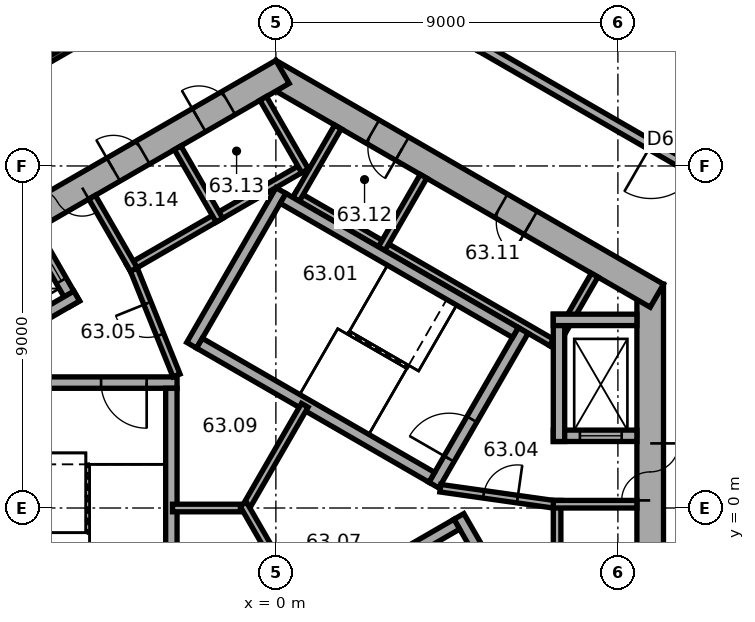
"""IFC4 building model, lengths in metres.
Left out: names, types, materials, properties, quantities, classifications, styles, units other than length and angle.
Written with IfcOpenShell. Run it as: python <this file> out.ifc"""

import sys

from ifc_helpers import new_model, si_unit, direction, frame, frame_2d, origin, place, context, subcontext, project, spatial, rectangle, extrude, element, fill, save


model = new_model("IFC4")
c1 = context("Model", 3, precision=1e-05, world=origin(), true_north=direction((0.0, 1.0)))
c2 = subcontext(c1, "Body", "Model", "MODEL_VIEW")
j1 = project(units=[si_unit("LENGTHUNIT", "METRE"), si_unit("PLANEANGLEUNIT", "RADIAN")], contexts=[c1])
p1 = place(None, origin())
s1 = spatial("IfcSite", under=j1, at=p1, CompositionType="ELEMENT")
p2 = place(p1, origin())
s2 = spatial("IfcBuilding", under=s1, at=p2, CompositionType="ELEMENT")
p3 = place(p2, frame((0.0, 0.0, 255.0)))
s3 = spatial("IfcBuildingStorey", under=s2, at=p3, CompositionType="ELEMENT", Elevation=255.0)
p4 = place(p3, frame((9.85, -5.889, 0.0), z_axis=(0.0, 0.0, 1.0), x_axis=(0.0, 1.0, 0.0)))
e1 = element("IfcWall", 1, at=p4, inside=s3, PredefinedType="SHEAR", context=c2, shape_type="SweptSolid", body=[
    extrude(rectangle(XDim=11.778, YDim=0.7, at=frame_2d((5.889, 0.0))), origin(), (0.0, 0.0, 1.0), 4.8),
])
p5 = place(p4, frame((6.089, 0.0, 0.0)))
e2 = element("IfcOpeningElement", 2, at=p5, cuts=e1, PredefinedType="OPENING", context=c2, shape_type="SweptSolid", body=[
    extrude(rectangle(XDim=1.5, YDim=2.1, at=frame_2d((0.75, 1.05))), frame((0.0, 0.36, 0.0), z_axis=(0.0, -1.0, 0.0), x_axis=(1.0, 0.0, 0.0)), (0.0, 0.0, 1.0), 0.72),
])
p6 = place(p4, frame((2.939, 0.0, 0.0)))
e3 = element("IfcOpeningElement", 3, at=p6, cuts=e1, PredefinedType="OPENING", context=c2, shape_type="SweptSolid", body=[
    extrude(rectangle(XDim=0.9, YDim=2.1, at=frame_2d((0.45, 1.05))), frame((0.0, 0.36, 0.0), z_axis=(0.0, -1.0, 0.0), x_axis=(1.0, 0.0, 0.0)), (0.0, 0.0, 1.0), 0.72),
])
p7 = place(p3, frame((10.025, 5.586, 0.0), z_axis=(0.0, 0.0, 1.0), x_axis=(-0.866026453023, 0.499998182661, 0.0)))
e4 = element("IfcWall", 4, at=p7, inside=s3, PredefinedType="SHEAR", context=c2, shape_type="SweptSolid", body=[
    extrude(rectangle(XDim=11.778, YDim=0.7, at=frame_2d((5.889, 0.0))), origin(), (0.0, 0.0, 1.0), 4.8),
])
p8 = place(p7, frame((3.839, 0.0, 0.0)))
e5 = element("IfcOpeningElement", 5, at=p8, cuts=e4, PredefinedType="OPENING", context=c2, shape_type="SweptSolid", body=[
    extrude(rectangle(XDim=0.9, YDim=2.1, at=frame_2d((0.45, 1.05))), frame((0.0, 0.36, 0.0), z_axis=(0.0, -1.0, 0.0), x_axis=(1.0, 0.0, 0.0)), (0.0, 0.0, 1.0), 0.72),
])
p9 = place(p7, frame((7.739, 0.0, 0.0)))
e6 = element("IfcOpeningElement", 6, at=p9, cuts=e4, PredefinedType="OPENING", context=c2, shape_type="SweptSolid", body=[
    extrude(rectangle(XDim=0.9, YDim=2.1, at=frame_2d((0.45, 1.05))), frame((0.0, 0.36, 0.0), z_axis=(0.0, -1.0, 0.0), x_axis=(1.0, 0.0, 0.0)), (0.0, 0.0, 1.0), 0.72),
])
p10 = place(p3, frame((0.175, 11.475, 0.0), z_axis=(0.0, 0.0, 1.0), x_axis=(-0.866026453023, -0.499998182661, 0.0)))
e7 = element("IfcWall", 7, at=p10, inside=s3, PredefinedType="SHEAR", context=c2, shape_type="SweptSolid", body=[
    extrude(rectangle(XDim=11.778, YDim=0.7, at=frame_2d((5.889, 0.0))), origin(), (0.0, 0.0, 1.0), 4.8),
])
p11 = place(p10, frame((6.089, 0.0, 0.0)))
e8 = element("IfcOpeningElement", 8, at=p11, cuts=e7, PredefinedType="OPENING", context=c2, shape_type="SweptSolid", body=[
    extrude(rectangle(XDim=1.5, YDim=2.1, at=frame_2d((0.75, 1.05))), frame((0.0, 0.36, 0.0), z_axis=(0.0, -1.0, 0.0), x_axis=(1.0, 0.0, 0.0)), (0.0, 0.0, 1.0), 0.72),
])
p12 = place(p10, frame((1.639, 0.0, 0.0)))
e9 = element("IfcOpeningElement", 9, at=p12, cuts=e7, PredefinedType="OPENING", context=c2, shape_type="SweptSolid", body=[
    extrude(rectangle(XDim=0.9, YDim=2.1, at=frame_2d((0.45, 1.05))), frame((0.0, 0.36, 0.0), z_axis=(0.0, -1.0, 0.0), x_axis=(1.0, 0.0, 0.0)), (0.0, 0.0, 1.0), 0.72),
])
p13 = place(p10, frame((4.239, 0.0, 0.0)))
e10 = element("IfcOpeningElement", 10, at=p13, cuts=e7, PredefinedType="OPENING", context=c2, shape_type="SweptSolid", body=[
    extrude(rectangle(XDim=0.9, YDim=2.1, at=frame_2d((0.45, 1.05))), frame((0.0, 0.36, 0.0), z_axis=(0.0, -1.0, 0.0), x_axis=(1.0, 0.0, 0.0)), (0.0, 0.0, 1.0), 0.72),
])
p14 = place(p3, frame((7.4, -5.2, 0.0), z_axis=(0.0, 0.0, 1.0), x_axis=(0.0, 1.0, 0.0)))
e11 = element("IfcWall", 11, at=p14, inside=s3, PredefinedType="PARTITIONING", context=c2, shape_type="SweptSolid", body=[
    extrude(rectangle(XDim=5.4, YDim=0.2, at=frame_2d((2.7, 0.0))), origin(), (0.0, 0.0, 1.0), 4.52),
])
p15 = place(p3, frame((7.3, 0.1, 0.0), z_axis=(0.0, 0.0, 1.0), x_axis=(1.0, 0.0, 0.0)))
e12 = element("IfcWall", 12, at=p15, inside=s3, PredefinedType="PARTITIONING", context=c2, shape_type="SweptSolid", body=[
    extrude(rectangle(XDim=2.2, YDim=0.2, at=frame_2d((1.1, 0.0))), origin(), (0.0, 0.0, 1.0), 4.52),
])
p16 = place(p3, frame((7.424, 4.259, 0.0), z_axis=(0.0, 0.0, 1.0), x_axis=(-0.866026010844, 0.49999894854, 0.0)))
e13 = element("IfcWall", 13, at=p16, inside=s3, PredefinedType="PARTITIONING", context=c2, shape_type="SweptSolid", body=[
    extrude(rectangle(XDim=8.0, YDim=0.2, at=frame_2d((4.0, 0.0))), origin(), (0.0, 0.0, 1.0), 4.52),
])
for number, where, z_axis, x_axis in (
    (14, (7.287, 4.222, 0.0), (0.0, 0.0, 1.0), (0.5, 0.866, 0.0)),
    (15, (2.784, 6.822, 0.0), (0.0, 0.0, 1.0), (0.5, 0.866, 0.0)),
    (16, (0.532, 8.122, 0.0), (0.0, 0.0, 1.0), (0.5, 0.866, 0.0)),
):
    element("IfcWall", number, at=place(p3, frame(where, z_axis=z_axis, x_axis=x_axis)), inside=s3, PredefinedType="PARTITIONING", context=c2, shape_type="SweptSolid", body=[
        extrude(rectangle(XDim=2.2, YDim=0.2, at=frame_2d((1.1, 0.0))), origin(), (0.0, 0.0, 1.0), 4.52),
    ])
p17 = place(p3, frame((0.803, 9.009, 0.0), z_axis=(0.0, 0.0, 1.0), x_axis=(-0.866028230842, -0.499995103361, 0.0)))
e17 = element("IfcWall", 17, at=p17, inside=s3, PredefinedType="PARTITIONING", context=c2, shape_type="SweptSolid", body=[
    extrude(rectangle(XDim=5.4, YDim=0.2, at=frame_2d((2.7, 0.0))), origin(), (0.0, 0.0, 1.0), 4.52),
])
p18 = place(p3, frame((0.767, 8.872, 0.0), z_axis=(0.0, 0.0, 1.0), x_axis=(-0.499994660107, 0.866028486751, 0.0)))
e18 = element("IfcWall", 18, at=p18, inside=s3, PredefinedType="PARTITIONING", context=c2, shape_type="SweptSolid", body=[
    extrude(rectangle(XDim=2.2, YDim=0.2, at=frame_2d((1.1, 0.0))), origin(), (0.0, 0.0, 1.0), 4.52),
])
for number, where, z_axis, x_axis in (
    (19, (-1.485, 7.572, 0.0), (0.0, 0.0, 1.0), (-0.5, 0.866, 0.0)),
    (20, (-3.737, 6.272, 0.0), (0.0, 0.0, 1.0), (-0.5, 0.866, 0.0)),
):
    element("IfcWall", number, at=place(p3, frame(where, z_axis=z_axis, x_axis=x_axis)), inside=s3, PredefinedType="PARTITIONING", context=c2, shape_type="SweptSolid", body=[
        extrude(rectangle(XDim=2.2, YDim=0.2, at=frame_2d((1.1, 0.0))), origin(), (0.0, 0.0, 1.0), 4.52),
    ])
p19 = place(p3, frame((4.158, 0.602, 0.0), z_axis=(0.0, 0.0, 1.0), x_axis=(0.499977259774, 0.866038532462, 0.0)))
e21 = element("IfcWall", 21, at=p19, inside=s3, PredefinedType="SHEAR", context=c2, shape_type="SweptSolid", body=[
    extrude(rectangle(XDim=4.7, YDim=0.3, at=frame_2d((2.35, 0.0))), origin(), (0.0, 0.0, 1.0), 4.52),
])
p20 = place(p19, frame((0.8, 0.0, 0.0)))
e22 = element("IfcOpeningElement", 22, at=p20, cuts=e21, PredefinedType="OPENING", context=c2, shape_type="SweptSolid", body=[
    extrude(rectangle(XDim=1.2, YDim=2.1, at=frame_2d((0.6, 1.05))), frame((0.0, 0.16, 0.0), z_axis=(0.0, -1.0, 0.0), x_axis=(1.0, 0.0, 0.0)), (0.0, 0.0, 1.0), 0.32),
])
p21 = place(p3, frame((-2.216, 4.282, 0.0), z_axis=(0.0, 0.0, 1.0), x_axis=(0.499977259774, 0.866038532462, 0.0)))
e23 = element("IfcWall", 23, at=p21, inside=s3, PredefinedType="SHEAR", context=c2, shape_type="SweptSolid", body=[
    extrude(rectangle(XDim=4.7, YDim=0.3, at=frame_2d((2.35, 0.0))), origin(), (0.0, 0.0, 1.0), 4.52),
])
for number, where, z_axis, x_axis in (
    (24, (4.103, 0.807, 0.0), (0.0, 0.0, 1.0), (-0.866, 0.5, 0.0)),
    (25, (6.303, 4.617, 0.0), (0.0, 0.0, 1.0), (-0.866, 0.5, 0.0)),
):
    element("IfcWall", number, at=place(p3, frame(where, z_axis=z_axis, x_axis=x_axis)), inside=s3, PredefinedType="SHEAR", context=c2, shape_type="SweptSolid", body=[
        extrude(rectangle(XDim=7.06, YDim=0.3, at=frame_2d((3.53, 0.0))), origin(), (0.0, 0.0, 1.0), 4.52),
    ])
p22 = place(p3, frame((-2.6, 3.3, 0.0), z_axis=(0.0, 0.0, 1.0), x_axis=(-1.0, 0.0, 0.0)))
e26 = element("IfcWall", 26, at=p22, inside=s3, PredefinedType="SHEAR", context=c2, shape_type="SweptSolid", body=[
    extrude(rectangle(XDim=4.7, YDim=0.3, at=frame_2d((2.35, 0.0))), origin(), (0.0, 0.0, 1.0), 4.52),
])
p23 = place(p22, frame((0.8, 0.0, 0.0)))
e27 = element("IfcOpeningElement", 27, at=p23, cuts=e26, PredefinedType="OPENING", context=c2, shape_type="SweptSolid", body=[
    extrude(rectangle(XDim=1.2, YDim=2.1, at=frame_2d((0.6, 1.05))), frame((0.0, 0.16, 0.0), z_axis=(0.0, -1.0, 0.0), x_axis=(1.0, 0.0, 0.0)), (0.0, 0.0, 1.0), 0.32),
])
p24 = place(p3, frame((-2.75, 3.15, 0.0), z_axis=(0.0, 0.0, 1.0), x_axis=(0.0, -1.0, 0.0)))
e28 = element("IfcWall", 28, at=p24, inside=s3, PredefinedType="SHEAR", context=c2, shape_type="SweptSolid", body=[
    extrude(rectangle(XDim=7.06, YDim=0.3, at=frame_2d((3.53, 0.0))), origin(), (0.0, 0.0, 1.0), 4.52),
])
p25 = place(p3, frame((4.816, -0.222, 0.0), z_axis=(0.0, 0.0, 1.0), x_axis=(0.499977259774, -0.866038532462, 0.0)))
e29 = element("IfcWall", 29, at=p25, inside=s3, PredefinedType="SHEAR", context=c2, shape_type="SweptSolid", body=[
    extrude(rectangle(XDim=4.7, YDim=0.3, at=frame_2d((2.35, 0.0))), origin(), (0.0, 0.0, 1.0), 4.52),
])
p26 = place(p3, frame((-1.353, -3.957, 0.0), z_axis=(0.0, 0.0, 1.0), x_axis=(0.866027801685, 0.499995846692, 0.0)))
e30 = element("IfcWall", 30, at=p26, inside=s3, PredefinedType="SHEAR", context=c2, shape_type="SweptSolid", body=[
    extrude(rectangle(XDim=7.06, YDim=0.3, at=frame_2d((3.53, 0.0))), origin(), (0.0, 0.0, 1.0), 4.52),
])
p27 = place(p3, frame((7.3, 1.9, 0.0), z_axis=(0.0, 0.0, 1.0), x_axis=(1.0, 0.0, 0.0)))
e31 = element("IfcWall", 31, at=p27, inside=s3, PredefinedType="SHEAR", context=c2, shape_type="SweptSolid", body=[
    extrude(rectangle(XDim=2.2, YDim=0.3, at=frame_2d((1.1, 0.0))), origin(), (0.0, 0.0, 1.0), 4.52),
])
p28 = place(p27, frame((0.7, 0.0, 0.0)))
e32 = element("IfcOpeningElement", 32, at=p28, cuts=e31, PredefinedType="OPENING", context=c2, shape_type="SweptSolid", body=[
    extrude(rectangle(XDim=1.1, YDim=2.1, at=frame_2d((0.55, 1.05))), frame((0.0, 0.16, 0.0), z_axis=(0.0, -1.0, 0.0), x_axis=(1.0, 0.0, 0.0)), (0.0, 0.0, 1.0), 0.32),
])
p29 = place(p3, frame((7.45, 1.75, 0.0), z_axis=(0.0, 0.0, 1.0), x_axis=(0.0, 1.0, 0.0)))
e33 = element("IfcWall", 33, at=p29, inside=s3, PredefinedType="SHEAR", context=c2, shape_type="SweptSolid", body=[
    extrude(rectangle(XDim=3.35, YDim=0.3, at=frame_2d((1.675, 0.0))), origin(), (0.0, 0.0, 1.0), 4.52),
])
p30 = place(p3, frame((7.3, 4.95, 0.0), z_axis=(0.0, 0.0, 1.0), x_axis=(1.0, 0.0, 0.0)))
e34 = element("IfcWall", 34, at=p30, inside=s3, PredefinedType="SHEAR", context=c2, shape_type="SweptSolid", body=[
    extrude(rectangle(XDim=2.2, YDim=0.3, at=frame_2d((1.1, 0.0))), origin(), (0.0, 0.0, 1.0), 4.52),
])
p31 = place(p3, frame((4.327, 0.521, 0.0), z_axis=(0.0, 0.0, 1.0), x_axis=(0.990124376366, -0.14019172346, 0.0)))
e35 = element("IfcWall", 35, at=p31, inside=s3, PredefinedType="PARTITIONING", context=c2, shape_type="SweptSolid", body=[
    extrude(rectangle(XDim=3.002, YDim=0.2, at=frame_2d((1.501, 0.0))), origin(), (0.0, 0.0, 1.0), 4.52),
])
p32 = place(p31, frame((1.15, 0.0, 0.0)))
e36 = element("IfcOpeningElement", 36, at=p32, cuts=e35, PredefinedType="OPENING", context=c2, shape_type="SweptSolid", body=[
    extrude(rectangle(XDim=0.9, YDim=2.1, at=frame_2d((0.45, 1.05))), frame((0.0, 0.11, 0.0), z_axis=(0.0, -1.0, 0.0), x_axis=(1.0, 0.0, 0.0)), (0.0, 0.0, 1.0), 0.22),
])
p33 = place(p3, frame((-5.295, 5.372, 0.0), z_axis=(0.0, 0.0, 1.0), x_axis=(-0.500077893725, 0.86598042715, 0.0)))
e37 = element("IfcWall", 37, at=p33, inside=s3, PredefinedType="SHEAR", context=c2, shape_type="SweptSolid", body=[
    extrude(rectangle(XDim=2.2, YDim=0.3, at=frame_2d((1.1, 0.0))), origin(), (0.0, 0.0, 1.0), 4.52),
])
p34 = place(p33, frame((0.7, 0.0, 0.0)))
e38 = element("IfcOpeningElement", 38, at=p34, cuts=e37, PredefinedType="OPENING", context=c2, shape_type="SweptSolid", body=[
    extrude(rectangle(XDim=1.1, YDim=2.1, at=frame_2d((0.55, 1.05))), frame((0.0, 0.16, 0.0), z_axis=(0.0, -1.0, 0.0), x_axis=(1.0, 0.0, 0.0)), (0.0, 0.0, 1.0), 0.32),
])
p35 = place(p3, frame((-5.24, 5.577, 0.0), z_axis=(0.0, 0.0, 1.0), x_axis=(-0.866014461049, -0.500018952895, 0.0)))
e39 = element("IfcWall", 39, at=p35, inside=s3, PredefinedType="SHEAR", context=c2, shape_type="SweptSolid", body=[
    extrude(rectangle(XDim=3.35, YDim=0.3, at=frame_2d((1.675, 0.0))), origin(), (0.0, 0.0, 1.0), 4.52),
])
p36 = place(p3, frame((-2.615, 3.487, 0.0), z_axis=(0.0, 0.0, 1.0), x_axis=(-0.373576831041, 0.92759924068, 0.0)))
e40 = element("IfcWall", 40, at=p36, inside=s3, PredefinedType="PARTITIONING", context=c2, shape_type="SweptSolid", body=[
    extrude(rectangle(XDim=3.002, YDim=0.2, at=frame_2d((1.501, 0.0))), origin(), (0.0, 0.0, 1.0), 4.52),
])
p37 = place(p36, frame((1.15, 0.0, 0.0)))
e41 = element("IfcOpeningElement", 41, at=p37, cuts=e40, PredefinedType="OPENING", context=c2, shape_type="SweptSolid", body=[
    extrude(rectangle(XDim=0.9, YDim=2.1, at=frame_2d((0.45, 1.05))), frame((0.0, 0.11, 0.0), z_axis=(0.0, -1.0, 0.0), x_axis=(1.0, 0.0, 0.0)), (0.0, 0.0, 1.0), 0.22),
])
p38 = place(p3, frame((-0.68, 0.0, 0.0), z_axis=(0.0, 0.0, 1.0), x_axis=(-1.0, 0.0, 0.0)))
e42 = element("IfcWall", 42, at=p38, inside=s3, PredefinedType="PARTITIONING", context=c2, shape_type="SweptSolid", body=[
    extrude(rectangle(XDim=2.04, YDim=0.2, at=frame_2d((1.02, 0.0))), origin(), (0.0, 0.0, 1.0), 4.52),
])
for number, where, z_axis, x_axis in (
    (43, (-0.86, -0.104, 0.0), (0.0, 0.0, 1.0), (0.5, 0.866, 0.0)),
    (44, (-0.86, 0.104, 0.0), (0.0, 0.0, 1.0), (0.5, -0.866, 0.0)),
):
    element("IfcWall", number, at=place(p3, frame(where, z_axis=z_axis, x_axis=x_axis)), inside=s3, PredefinedType="PARTITIONING", context=c2, shape_type="SweptSolid", body=[
        extrude(rectangle(XDim=3.24, YDim=0.2, at=frame_2d((1.62, 0.0))), origin(), (0.0, 0.0, 1.0), 4.52),
    ])
p39 = place(p3, frame((-8.089, 10.572, 0.0), z_axis=(0.0, 0.0, 1.0), x_axis=(0.866021869519, 0.500006121477, 0.0)))
e45 = element("IfcWall", 45, at=p39, inside=s3, PredefinedType="PARTITIONING", context=c2, shape_type="SweptSolid", body=[
    extrude(rectangle(XDim=4.42, YDim=0.15, at=frame_2d((2.21, 0.0))), origin(), (0.0, 0.0, 1.0), 4.52),
])
p40 = place(p39, frame((0.6, 0.0, 0.0)))
e46 = element("IfcOpeningElement", 46, at=p40, cuts=e45, PredefinedType="OPENING", context=c2, shape_type="SweptSolid", body=[
    extrude(rectangle(XDim=1.0, YDim=2.1, at=frame_2d((0.5, 1.05))), frame((0.0, 0.085, 0.0), z_axis=(0.0, -1.0, 0.0), x_axis=(1.0, 0.0, 0.0)), (0.0, 0.0, 1.0), 0.17),
])
p41 = place(p3, frame((-17.844, 11.412, 0.0), z_axis=(0.0, 0.0, 1.0), x_axis=(0.86603532492, 0.499982815695, 0.0)))
e47 = element("IfcWall", 47, at=p41, inside=s3, PredefinedType="SOLIDWALL", context=c2, shape_type="SweptSolid", body=[
    extrude(rectangle(XDim=17.885, YDim=0.25, at=frame_2d((8.942, 0.0))), origin(), (0.0, 0.0, 1.0), 4.02),
])
p42 = place(p3, frame((15.149, 11.685, 0.0), z_axis=(0.0, 0.0, 1.0), x_axis=(-0.86600739608, 0.500031188962, 0.0)))
e48 = element("IfcWall", 48, at=p42, inside=s3, PredefinedType="SOLIDWALL", context=c2, shape_type="SweptSolid", body=[
    extrude(rectangle(XDim=9.195, YDim=0.25, at=frame_2d((4.598, 0.0))), origin(), (0.0, 0.0, 1.0), 4.52),
])
p43 = place(p3, frame((5.361, 12.147, 0.0), z_axis=(0.0, 0.0, 1.0), x_axis=(0.86601958666, -0.500010075419, 0.0)))
e49 = element("IfcWall", 49, at=p43, inside=s3, PredefinedType="SOLIDWALL", context=c2, shape_type="SweptSolid", body=[
    extrude(rectangle(XDim=6.858, YDim=0.25, at=frame_2d((3.429, 0.0))), origin(), (0.0, 0.0, 1.0), 4.52),
])
p44 = place(p43, frame((5.208, 0.0, 0.0)))
e50 = element("IfcOpeningElement", 50, at=p44, cuts=e49, PredefinedType="OPENING", context=c2, shape_type="SweptSolid", body=[
    extrude(rectangle(XDim=1.4, YDim=2.1, at=frame_2d((0.7, 1.05))), frame((0.0, 0.135, 0.0), z_axis=(0.0, -1.0, 0.0), x_axis=(1.0, 0.0, 0.0)), (0.0, 0.0, 1.0), 0.27),
])
p45 = place(p5, origin())
e51 = element("IfcDoor", 51, at=p45, inside=s3, OperationType="DOUBLE_DOOR_SINGLE_SWING", PredefinedType="DOOR", context=c2, shape_type="SweptSolid", body=[
    extrude(rectangle(XDim=1.5, YDim=2.1, at=frame_2d((0.75, 1.05))), frame((0.0, 0.025, 0.0), z_axis=(0.0, -1.0, 0.0), x_axis=(1.0, 0.0, 0.0)), (0.0, 0.0, 1.0), 0.05),
])
fill(e2, e51)
p46 = place(p11, origin())
e52 = element("IfcDoor", 52, at=p46, inside=s3, OperationType="DOUBLE_DOOR_SINGLE_SWING", PredefinedType="DOOR", context=c2, shape_type="SweptSolid", body=[
    extrude(rectangle(XDim=1.5, YDim=2.1, at=frame_2d((0.75, 1.05))), frame((0.0, 0.025, 0.0), z_axis=(0.0, -1.0, 0.0), x_axis=(1.0, 0.0, 0.0)), (0.0, 0.0, 1.0), 0.05),
])
fill(e8, e52)
p47 = place(p20, origin())
e53 = element("IfcDoor", 53, at=p47, inside=s3, OperationType="SINGLE_SWING_RIGHT", PredefinedType="DOOR", context=c2, shape_type="SweptSolid", body=[
    extrude(rectangle(XDim=1.2, YDim=2.1, at=frame_2d((0.6, 1.05))), frame((0.0, 0.025, 0.0), z_axis=(0.0, -1.0, 0.0), x_axis=(1.0, 0.0, 0.0)), (0.0, 0.0, 1.0), 0.05),
])
fill(e22, e53)
p48 = place(p23, origin())
e54 = element("IfcDoor", 54, at=p48, inside=s3, OperationType="SINGLE_SWING_RIGHT", PredefinedType="DOOR", context=c2, shape_type="SweptSolid", body=[
    extrude(rectangle(XDim=1.2, YDim=2.1, at=frame_2d((0.6, 1.05))), frame((0.0, 0.025, 0.0), z_axis=(0.0, -1.0, 0.0), x_axis=(1.0, 0.0, 0.0)), (0.0, 0.0, 1.0), 0.05),
])
fill(e27, e54)
p49 = place(p32, origin())
e55 = element("IfcDoor", 55, at=p49, inside=s3, OperationType="SINGLE_SWING_LEFT", PredefinedType="DOOR", context=c2, shape_type="SweptSolid", body=[
    extrude(rectangle(XDim=0.9, YDim=2.1, at=frame_2d((0.45, 1.05))), frame((0.0, 0.025, 0.0), z_axis=(0.0, -1.0, 0.0), x_axis=(1.0, 0.0, 0.0)), (0.0, 0.0, 1.0), 0.05),
])
fill(e36, e55)
p50 = place(p37, origin())
e56 = element("IfcDoor", 56, at=p50, inside=s3, OperationType="SINGLE_SWING_LEFT", PredefinedType="DOOR", context=c2, shape_type="SweptSolid", body=[
    extrude(rectangle(XDim=0.9, YDim=2.1, at=frame_2d((0.45, 1.05))), frame((0.0, 0.025, 0.0), z_axis=(0.0, -1.0, 0.0), x_axis=(1.0, 0.0, 0.0)), (0.0, 0.0, 1.0), 0.05),
])
fill(e41, e56)
p51 = place(p8, origin())
e57 = element("IfcDoor", 57, at=p51, inside=s3, OperationType="SINGLE_SWING_LEFT", PredefinedType="DOOR", context=c2, shape_type="SweptSolid", body=[
    extrude(rectangle(XDim=0.9, YDim=2.1, at=frame_2d((0.45, 1.05))), frame((0.0, 0.025, 0.0), z_axis=(0.0, -1.0, 0.0), x_axis=(1.0, 0.0, 0.0)), (0.0, 0.0, 1.0), 0.05),
])
fill(e5, e57)
p52 = place(p9, origin())
e58 = element("IfcDoor", 58, at=p52, inside=s3, OperationType="SINGLE_SWING_LEFT", PredefinedType="DOOR", context=c2, shape_type="SweptSolid", body=[
    extrude(rectangle(XDim=0.9, YDim=2.1, at=frame_2d((0.45, 1.05))), frame((0.0, 0.025, 0.0), z_axis=(0.0, -1.0, 0.0), x_axis=(1.0, 0.0, 0.0)), (0.0, 0.0, 1.0), 0.05),
])
fill(e6, e58)
p53 = place(p12, origin())
e59 = element("IfcDoor", 59, at=p53, inside=s3, OperationType="SINGLE_SWING_LEFT", PredefinedType="DOOR", context=c2, shape_type="SweptSolid", body=[
    extrude(rectangle(XDim=0.9, YDim=2.1, at=frame_2d((0.45, 1.05))), frame((0.0, 0.025, 0.0), z_axis=(0.0, -1.0, 0.0), x_axis=(1.0, 0.0, 0.0)), (0.0, 0.0, 1.0), 0.05),
])
fill(e9, e59)
p54 = place(p13, origin())
e60 = element("IfcDoor", 60, at=p54, inside=s3, OperationType="SINGLE_SWING_LEFT", PredefinedType="DOOR", context=c2, shape_type="SweptSolid", body=[
    extrude(rectangle(XDim=0.9, YDim=2.1, at=frame_2d((0.45, 1.05))), frame((0.0, 0.025, 0.0), z_axis=(0.0, -1.0, 0.0), x_axis=(1.0, 0.0, 0.0)), (0.0, 0.0, 1.0), 0.05),
])
fill(e10, e60)
p55 = place(p28, origin())
e61 = element("IfcDoor", 61, at=p55, inside=s3, OperationType="DOUBLE_DOOR_SLIDING", PredefinedType="DOOR", context=c2, shape_type="SweptSolid", body=[
    extrude(rectangle(XDim=1.1, YDim=2.1, at=frame_2d((0.55, 1.05))), frame((0.0, 0.025, 0.0), z_axis=(0.0, -1.0, 0.0), x_axis=(1.0, 0.0, 0.0)), (0.0, 0.0, 1.0), 0.05),
])
fill(e32, e61)
p56 = place(p34, origin())
e62 = element("IfcDoor", 62, at=p56, inside=s3, OperationType="DOUBLE_DOOR_SLIDING", PredefinedType="DOOR", context=c2, shape_type="SweptSolid", body=[
    extrude(rectangle(XDim=1.1, YDim=2.1, at=frame_2d((0.55, 1.05))), frame((0.0, 0.025, 0.0), z_axis=(0.0, -1.0, 0.0), x_axis=(1.0, 0.0, 0.0)), (0.0, 0.0, 1.0), 0.05),
])
fill(e38, e62)
p57 = place(p44, origin())
e63 = element("IfcDoor", 63, at=p57, inside=s3, OperationType="SINGLE_SWING_LEFT", PredefinedType="DOOR", context=c2, shape_type="SweptSolid", body=[
    extrude(rectangle(XDim=1.4, YDim=2.1, at=frame_2d((0.7, 1.05))), frame((0.0, 0.025, 0.0), z_axis=(0.0, -1.0, 0.0), x_axis=(1.0, 0.0, 0.0)), (0.0, 0.0, 1.0), 0.05),
])
fill(e50, e63)
save(model, sys.argv[1])
